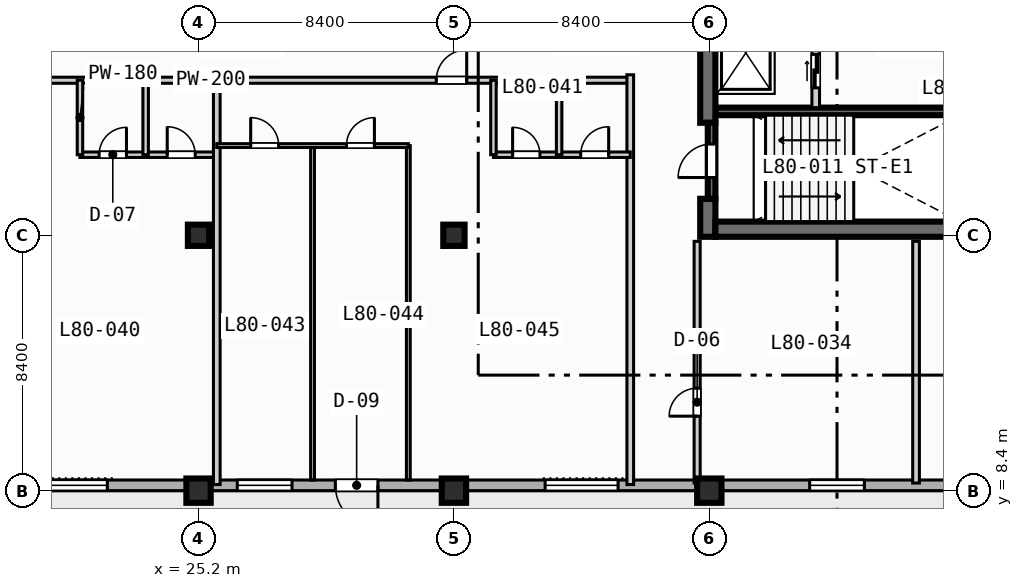
"""IFC4 building model, lengths in metres.
Left out: names, types, materials, properties, quantities, classifications, styles, units other than length and angle.
Written with IfcOpenShell. Run it as: python <this file> out.ifc"""

import sys

from ifc_helpers import new_model, si_unit, direction, frame, frame_2d, origin, origin_2d, place, context, subcontext, project, spatial, rectangle, extrude, element, fill, save


model = new_model("IFC4")
c1 = context("Model", 3, precision=1e-05, world=origin(), true_north=direction((0.0, 1.0)))
c2 = subcontext(c1, "Body", "Model", "MODEL_VIEW")
j1 = project(units=[si_unit("LENGTHUNIT", "METRE"), si_unit("PLANEANGLEUNIT", "RADIAN")], contexts=[c1])
p1 = place(None, origin())
s1 = spatial("IfcSite", under=j1, at=p1, CompositionType="ELEMENT")
p2 = place(p1, origin())
s2 = spatial("IfcBuilding", under=s1, at=p2, CompositionType="ELEMENT")
p3 = place(p2, frame((0.0, 0.0, 324.2)))
s3 = spatial("IfcBuildingStorey", under=s2, at=p3, CompositionType="ELEMENT", Elevation=324.2)
p4 = place(p3, frame((42.2, 20.875, 0.0), z_axis=(0.0, 0.0, 1.0), x_axis=(1.0, 0.0, 0.0)))
e1 = element("IfcWall", 1, at=p4, inside=s3, PredefinedType="SOLIDWALL", context=c2, shape_type="SweptSolid", body=[
    extrude(rectangle(XDim=8.05, YDim=0.25, at=frame_2d((4.025, 0.0))), origin(), (0.0, 0.0, 1.0), 3.67),
])
p5 = place(p3, frame((41.95, 16.75, 0.0), z_axis=(0.0, 0.0, 1.0), x_axis=(0.0, 1.0, 0.0)))
e2 = element("IfcWall", 2, at=p5, inside=s3, PredefinedType="SHEAR", context=c2, shape_type="SweptSolid", body=[
    extrude(rectangle(XDim=1.25, YDim=0.5, at=frame_2d((0.625, 0.0))), origin(), (0.0, 0.0, 1.0), 3.67),
])
p6 = place(p3, frame((41.95, 20.5, 0.0), z_axis=(0.0, 0.0, 1.0), x_axis=(0.0, 1.0, 0.0)))
e3 = element("IfcWall", 3, at=p6, inside=s3, PredefinedType="SHEAR", context=c2, shape_type="SweptSolid", body=[
    extrude(rectangle(XDim=4.95, YDim=0.5, at=frame_2d((2.475, 0.0))), origin(), (0.0, 0.0, 1.0), 3.67),
])
p7 = place(p3, frame((42.2, 17.0, 0.0), z_axis=(0.0, 0.0, 1.0), x_axis=(1.0, 0.0, 0.0)))
e4 = element("IfcWall", 4, at=p7, inside=s3, PredefinedType="SHEAR", context=c2, shape_type="SweptSolid", body=[
    extrude(rectangle(XDim=16.35, YDim=0.5, at=frame_2d((8.175, 0.0))), origin(), (0.0, 0.0, 1.0), 3.67),
])
p8 = place(p3, frame((25.2, 8.4, 0.0), z_axis=(0.0, 0.0, 1.0), x_axis=(1.0, 0.0, 0.0)))
e5 = element("IfcColumn", 5, at=p8, inside=s3, PredefinedType="COLUMN", context=c2, shape_type="SweptSolid", body=[
    extrude(rectangle(XDim=0.8, YDim=0.8, at=origin_2d()), origin(), (0.0, 0.0, 1.0), 3.9),
])
p9 = place(p3, frame((25.2, 16.8, 0.0), z_axis=(0.0, 0.0, 1.0), x_axis=(1.0, 0.0, 0.0)))
e6 = element("IfcColumn", 6, at=p9, inside=s3, PredefinedType="COLUMN", context=c2, shape_type="SweptSolid", body=[
    extrude(rectangle(XDim=0.7, YDim=0.7, at=origin_2d()), origin(), (0.0, 0.0, 1.0), 3.9),
])
p10 = place(p3, frame((33.6, 8.4, 0.0), z_axis=(0.0, 0.0, 1.0), x_axis=(1.0, 0.0, 0.0)))
e7 = element("IfcColumn", 7, at=p10, inside=s3, PredefinedType="COLUMN", context=c2, shape_type="SweptSolid", body=[
    extrude(rectangle(XDim=0.8, YDim=0.8, at=origin_2d()), origin(), (0.0, 0.0, 1.0), 3.9),
])
p11 = place(p3, frame((33.6, 16.8, 0.0), z_axis=(0.0, 0.0, 1.0), x_axis=(1.0, 0.0, 0.0)))
e8 = element("IfcColumn", 8, at=p11, inside=s3, PredefinedType="COLUMN", context=c2, shape_type="SweptSolid", body=[
    extrude(rectangle(XDim=0.7, YDim=0.7, at=origin_2d()), origin(), (0.0, 0.0, 1.0), 3.9),
])
p12 = place(p3, frame((42.0, 8.4, 0.0), z_axis=(0.0, 0.0, 1.0), x_axis=(1.0, 0.0, 0.0)))
e9 = element("IfcColumn", 9, at=p12, inside=s3, PredefinedType="COLUMN", context=c2, shape_type="SweptSolid", body=[
    extrude(rectangle(XDim=0.8, YDim=0.8, at=origin_2d()), origin(), (0.0, 0.0, 1.0), 3.9),
])
p13 = place(p3, frame((64.025, 8.575, 0.0), z_axis=(0.0, 0.0, 1.0), x_axis=(-1.0, 0.0, 0.0)))
e10 = element("IfcWall", 10, at=p13, inside=s3, PredefinedType="STANDARD", context=c2, shape_type="SweptSolid", body=[
    extrude(rectangle(XDim=52.45, YDim=0.35, at=frame_2d((26.225, 0.0))), origin(), (0.0, 0.0, 1.0), 3.67),
])
p14 = place(p13, frame((32.925, 0.0, 0.0)))
e11 = element("IfcOpeningElement", 11, at=p14, cuts=e10, PredefinedType="OPENING", context=c2, shape_type="SweptSolid", body=[
    extrude(rectangle(XDim=1.4, YDim=2.2, at=frame_2d((0.7, 1.1))), frame((0.0, 0.185, 0.0), z_axis=(0.0, -1.0, 0.0), x_axis=(1.0, 0.0, 0.0)), (0.0, 0.0, 1.0), 0.37),
])
p15 = place(p13, frame((41.825, 0.0, 0.85)))
e12 = element("IfcOpeningElement", 12, at=p15, cuts=e10, PredefinedType="OPENING", context=c2, shape_type="SweptSolid", body=[
    extrude(rectangle(XDim=2.4, YDim=1.95, at=frame_2d((1.2, 0.975))), frame((0.0, 0.185, 0.0), z_axis=(0.0, -1.0, 0.0), x_axis=(1.0, 0.0, 0.0)), (0.0, 0.0, 1.0), 0.37),
])
p16 = place(p13, frame((25.025, 0.0, 0.85)))
e13 = element("IfcOpeningElement", 13, at=p16, cuts=e10, PredefinedType="OPENING", context=c2, shape_type="SweptSolid", body=[
    extrude(rectangle(XDim=2.4, YDim=1.95, at=frame_2d((1.2, 0.975))), frame((0.0, 0.185, 0.0), z_axis=(0.0, -1.0, 0.0), x_axis=(1.0, 0.0, 0.0)), (0.0, 0.0, 1.0), 0.37),
])
p17 = place(p13, frame((16.925, 0.0, 0.85)))
e14 = element("IfcOpeningElement", 14, at=p17, cuts=e10, PredefinedType="OPENING", context=c2, shape_type="SweptSolid", body=[
    extrude(rectangle(XDim=1.8, YDim=1.8, at=frame_2d((0.9, 0.9))), frame((0.0, 0.185, 0.0), z_axis=(0.0, -1.0, 0.0), x_axis=(1.0, 0.0, 0.0)), (0.0, 0.0, 1.0), 0.37),
])
p18 = place(p13, frame((49.75, 0.0, 0.85)))
e15 = element("IfcOpeningElement", 15, at=p18, cuts=e10, PredefinedType="OPENING", context=c2, shape_type="SweptSolid", body=[
    extrude(rectangle(XDim=1.8, YDim=1.8, at=frame_2d((0.9, 0.9))), frame((0.0, 0.185, 0.0), z_axis=(0.0, -1.0, 0.0), x_axis=(1.0, 0.0, 0.0)), (0.0, 0.0, 1.0), 0.37),
])
p19 = place(p13, frame((47.89, 0.0, 0.85)))
e16 = element("IfcOpeningElement", 16, at=p19, cuts=e10, PredefinedType="OPENING", context=c2, shape_type="SweptSolid", body=[
    extrude(rectangle(XDim=0.72, YDim=1.8, at=frame_2d((0.36, 0.9))), frame((0.0, 0.185, 0.0), z_axis=(0.0, -1.0, 0.0), x_axis=(1.0, 0.0, 0.0)), (0.0, 0.0, 1.0), 0.37),
])
p20 = place(p13, frame((35.75, 0.0, 0.85)))
e17 = element("IfcOpeningElement", 17, at=p20, cuts=e10, PredefinedType="OPENING", context=c2, shape_type="SweptSolid", body=[
    extrude(rectangle(XDim=1.8, YDim=1.8, at=frame_2d((0.9, 0.9))), frame((0.0, 0.185, 0.0), z_axis=(0.0, -1.0, 0.0), x_axis=(1.0, 0.0, 0.0)), (0.0, 0.0, 1.0), 0.37),
])
p21 = place(p3, frame((42.075, 18.0, 0.0), z_axis=(0.0, 0.0, 1.0), x_axis=(0.0, 1.0, 0.0)))
e18 = element("IfcWall", 18, at=p21, inside=s3, PredefinedType="SOLIDWALL", context=c2, shape_type="SweptSolid", body=[
    extrude(rectangle(XDim=2.5, YDim=0.25, at=frame_2d((1.25, 0.0))), origin(), (0.0, 0.0, 1.0), 3.67),
])
p22 = place(p21, frame((0.7, 0.0, 0.0)))
e19 = element("IfcOpeningElement", 19, at=p22, cuts=e18, PredefinedType="OPENING", context=c2, shape_type="SweptSolid", body=[
    extrude(rectangle(XDim=1.1, YDim=2.15, at=frame_2d((0.55, 1.075))), frame((0.0, 0.135, 0.0), z_axis=(0.0, -1.0, 0.0), x_axis=(1.0, 0.0, 0.0)), (0.0, 0.0, 1.0), 0.27),
])
p23 = place(p3, frame((45.5, 21.0, 0.0), z_axis=(0.0, 0.0, 1.0), x_axis=(0.0, 1.0, 0.0)))
e20 = element("IfcWall", 20, at=p23, inside=s3, PredefinedType="SOLIDWALL", context=c2, shape_type="SweptSolid", body=[
    extrude(rectangle(XDim=4.15, YDim=0.25, at=frame_2d((2.075, 0.0))), origin(), (0.0, 0.0, 1.0), 3.67),
])
p24 = place(p23, frame((0.65, 0.0, 0.0)))
e21 = element("IfcOpeningElement", 21, at=p24, cuts=e20, PredefinedType="OPENING", context=c2, shape_type="SweptSolid", body=[
    extrude(rectangle(XDim=1.1, YDim=2.15, at=frame_2d((0.55, 1.075))), frame((0.0, 0.135, 0.0), z_axis=(0.0, -1.0, 0.0), x_axis=(1.0, 0.0, 0.0)), (0.0, 0.0, 1.0), 0.27),
])
p25 = place(p3, frame((41.6, 8.65, 0.0), z_axis=(0.0, 0.0, 1.0), x_axis=(0.0, 1.0, 0.0)))
e22 = element("IfcWall", 22, at=p25, inside=s3, PredefinedType="PARTITIONING", context=c2, shape_type="SweptSolid", body=[
    extrude(rectangle(XDim=7.95, YDim=0.2, at=frame_2d((3.975, 0.0))), origin(), (0.0, 0.0, 1.0), 3.67),
])
p26 = place(p25, frame((2.2, 0.0, 0.0)))
e23 = element("IfcOpeningElement", 23, at=p26, cuts=e22, PredefinedType="OPENING", context=c2, shape_type="SweptSolid", body=[
    extrude(rectangle(XDim=0.92, YDim=2.1, at=frame_2d((0.46, 1.05))), frame((0.0, 0.11, 0.0), z_axis=(0.0, -1.0, 0.0), x_axis=(1.0, 0.0, 0.0)), (0.0, 0.0, 1.0), 0.22),
])
p27 = place(p3, frame((48.8, 8.65, 0.0), z_axis=(0.0, 0.0, 1.0), x_axis=(0.0, 1.0, 0.0)))
e24 = element("IfcWall", 24, at=p27, inside=s3, PredefinedType="PARTITIONING", context=c2, shape_type="SweptSolid", body=[
    extrude(rectangle(XDim=7.95, YDim=0.22, at=frame_2d((3.975, 0.0))), origin(), (0.0, 0.0, 1.0), 3.67),
])
p28 = place(p3, frame((11.8, 21.9, 0.0), z_axis=(0.0, 0.0, 1.0), x_axis=(1.0, 0.0, 0.0)))
e25 = element("IfcWall", 25, at=p28, inside=s3, PredefinedType="PARTITIONING", context=c2, shape_type="SweptSolid", body=[
    extrude(rectangle(XDim=27.6, YDim=0.2, at=frame_2d((13.8, 0.0))), origin(), (0.0, 0.0, 1.0), 3.67),
])
p29 = place(p28, frame((7.42, 0.0, 0.0)))
e26 = element("IfcOpeningElement", 26, at=p29, cuts=e25, PredefinedType="OPENING", context=c2, shape_type="SweptSolid", body=[
    extrude(rectangle(XDim=1.0, YDim=2.15, at=frame_2d((0.5, 1.075))), frame((0.0, 0.11, 0.0), z_axis=(0.0, -1.0, 0.0), x_axis=(1.0, 0.0, 0.0)), (0.0, 0.0, 1.0), 0.22),
])
p30 = place(p28, frame((21.22, 0.0, 0.0)))
e27 = element("IfcOpeningElement", 27, at=p30, cuts=e25, PredefinedType="OPENING", context=c2, shape_type="SweptSolid", body=[
    extrude(rectangle(XDim=1.0, YDim=2.15, at=frame_2d((0.5, 1.075))), frame((0.0, 0.11, 0.0), z_axis=(0.0, -1.0, 0.0), x_axis=(1.0, 0.0, 0.0)), (0.0, 0.0, 1.0), 0.22),
])
p31 = place(p3, frame((21.3, 19.45, 0.0), z_axis=(0.0, 0.0, 1.0), x_axis=(1.0, 0.0, 0.0)))
e28 = element("IfcWall", 28, at=p31, inside=s3, PredefinedType="PLUMBINGWALL", context=c2, shape_type="SweptSolid", body=[
    extrude(rectangle(XDim=4.5, YDim=0.18, at=frame_2d((2.25, 0.0))), origin(), (0.0, 0.0, 1.0), 3.67),
])
p32 = place(p31, frame((0.63, 0.0, 0.0)))
e29 = element("IfcOpeningElement", 29, at=p32, cuts=e28, PredefinedType="OPENING", context=c2, shape_type="SweptSolid", body=[
    extrude(rectangle(XDim=0.9, YDim=2.1, at=frame_2d((0.45, 1.05))), frame((0.0, 0.1, 0.0), z_axis=(0.0, -1.0, 0.0), x_axis=(1.0, 0.0, 0.0)), (0.0, 0.0, 1.0), 0.2),
])
p33 = place(p31, frame((2.87, 0.0, 0.0)))
e30 = element("IfcOpeningElement", 30, at=p33, cuts=e28, PredefinedType="OPENING", context=c2, shape_type="SweptSolid", body=[
    extrude(rectangle(XDim=0.92, YDim=2.1, at=frame_2d((0.46, 1.05))), frame((0.0, 0.1, 0.0), z_axis=(0.0, -1.0, 0.0), x_axis=(1.0, 0.0, 0.0)), (0.0, 0.0, 1.0), 0.2),
])
for number, where, z_axis, x_axis in (
    (31, (21.3, 19.45, 0.0), (0.0, 0.0, 1.0), (0.0, 1.0, 0.0)),
    (32, (23.46, 19.45, 0.0), (0.0, 0.0, 1.0), (0.0, 1.0, 0.0)),
):
    element("IfcWall", number, at=place(p3, frame(where, z_axis=z_axis, x_axis=x_axis)), inside=s3, PredefinedType="PLUMBINGWALL", context=c2, shape_type="SweptSolid", body=[
        extrude(rectangle(XDim=2.45, YDim=0.18, at=frame_2d((1.225, 0.0))), origin(), (0.0, 0.0, 1.0), 3.67),
    ])
for number, where, z_axis, x_axis in (
    (33, (25.8, 8.6, 0.0), (0.0, 0.0, 1.0), (0.0, 1.0, 0.0)),
    (34, (39.4, 8.6, 0.0), (0.0, 0.0, 1.0), (0.0, 1.0, 0.0)),
):
    element("IfcWall", number, at=place(p3, frame(where, z_axis=z_axis, x_axis=x_axis)), inside=s3, PredefinedType="PARTITIONING", context=c2, shape_type="SweptSolid", body=[
        extrude(rectangle(XDim=13.48, YDim=0.22, at=frame_2d((6.74, 0.0))), origin(), (0.0, 0.0, 1.0), 3.67),
    ])
p34 = place(p3, frame((34.9, 19.45, 0.0), z_axis=(0.0, 0.0, 1.0), x_axis=(1.0, 0.0, 0.0)))
e35 = element("IfcWall", 35, at=p34, inside=s3, PredefinedType="PLUMBINGWALL", context=c2, shape_type="SweptSolid", body=[
    extrude(rectangle(XDim=4.5, YDim=0.18, at=frame_2d((2.25, 0.0))), origin(), (0.0, 0.0, 1.0), 3.67),
])
p35 = place(p34, frame((0.63, 0.0, 0.0)))
e36 = element("IfcOpeningElement", 36, at=p35, cuts=e35, PredefinedType="OPENING", context=c2, shape_type="SweptSolid", body=[
    extrude(rectangle(XDim=0.9, YDim=2.1, at=frame_2d((0.45, 1.05))), frame((0.0, 0.1, 0.0), z_axis=(0.0, -1.0, 0.0), x_axis=(1.0, 0.0, 0.0)), (0.0, 0.0, 1.0), 0.2),
])
p36 = place(p34, frame((2.87, 0.0, 0.0)))
e37 = element("IfcOpeningElement", 37, at=p36, cuts=e35, PredefinedType="OPENING", context=c2, shape_type="SweptSolid", body=[
    extrude(rectangle(XDim=0.92, YDim=2.1, at=frame_2d((0.46, 1.05))), frame((0.0, 0.1, 0.0), z_axis=(0.0, -1.0, 0.0), x_axis=(1.0, 0.0, 0.0)), (0.0, 0.0, 1.0), 0.2),
])
for number, where, z_axis, x_axis in (
    (38, (34.9, 19.45, 0.0), (0.0, 0.0, 1.0), (0.0, 1.0, 0.0)),
    (39, (37.06, 19.45, 0.0), (0.0, 0.0, 1.0), (0.0, 1.0, 0.0)),
):
    element("IfcWall", number, at=place(p3, frame(where, z_axis=z_axis, x_axis=x_axis)), inside=s3, PredefinedType="PLUMBINGWALL", context=c2, shape_type="SweptSolid", body=[
        extrude(rectangle(XDim=2.45, YDim=0.18, at=frame_2d((1.225, 0.0))), origin(), (0.0, 0.0, 1.0), 3.67),
    ])
for number, where, z_axis, x_axis in (
    (40, (28.95, 8.75, 0.0), (0.0, 0.0, 1.0), (0.0, 1.0, 0.0)),
    (41, (32.1, 8.75, 0.0), (0.0, 0.0, 1.0), (0.0, 1.0, 0.0)),
):
    element("IfcWall", number, at=place(p3, frame(where, z_axis=z_axis, x_axis=x_axis)), inside=s3, PredefinedType="PARTITIONING", context=c2, shape_type="SweptSolid", body=[
        extrude(rectangle(XDim=11.0, YDim=0.125, at=frame_2d((5.5, 0.0))), origin(), (0.0, 0.0, 1.0), 3.67),
    ])
p37 = place(p3, frame((25.8, 19.75, 0.0), z_axis=(0.0, 0.0, 1.0), x_axis=(1.0, 0.0, 0.0)))
e42 = element("IfcWall", 42, at=p37, inside=s3, PredefinedType="PARTITIONING", context=c2, shape_type="SweptSolid", body=[
    extrude(rectangle(XDim=6.3, YDim=0.125, at=frame_2d((3.15, 0.0))), origin(), (0.0, 0.0, 1.0), 3.67),
])
p38 = place(p37, frame((1.115, 0.0, 0.0)))
e43 = element("IfcOpeningElement", 43, at=p38, cuts=e42, PredefinedType="OPENING", context=c2, shape_type="SweptSolid", body=[
    extrude(rectangle(XDim=0.92, YDim=2.1, at=frame_2d((0.46, 1.05))), frame((0.0, 0.073, 0.0), z_axis=(0.0, -1.0, 0.0), x_axis=(1.0, 0.0, 0.0)), (0.0, 0.0, 1.0), 0.145),
])
p39 = place(p37, frame((4.265, 0.0, 0.0)))
e44 = element("IfcOpeningElement", 44, at=p39, cuts=e42, PredefinedType="OPENING", context=c2, shape_type="SweptSolid", body=[
    extrude(rectangle(XDim=0.92, YDim=2.1, at=frame_2d((0.46, 1.05))), frame((0.0, 0.073, 0.0), z_axis=(0.0, -1.0, 0.0), x_axis=(1.0, 0.0, 0.0)), (0.0, 0.0, 1.0), 0.145),
])
p40 = place(p14, origin())
e45 = element("IfcDoor", 45, at=p40, inside=s3, OperationType="SINGLE_SWING_LEFT", PredefinedType="DOOR", context=c2, shape_type="SweptSolid", body=[
    extrude(rectangle(XDim=1.4, YDim=2.2, at=frame_2d((0.7, 1.1))), frame((0.0, 0.025, 0.0), z_axis=(0.0, -1.0, 0.0), x_axis=(1.0, 0.0, 0.0)), (0.0, 0.0, 1.0), 0.05),
])
fill(e11, e45)
p41 = place(p15, origin())
e46 = element("IfcWindow", 46, at=p41, inside=s3, PartitioningType="SINGLE_PANEL", PredefinedType="WINDOW", context=c2, shape_type="SweptSolid", body=[
    extrude(rectangle(XDim=2.4, YDim=1.95, at=frame_2d((1.2, 0.975))), frame((0.0, 0.03, 0.0), z_axis=(0.0, -1.0, 0.0), x_axis=(1.0, 0.0, 0.0)), (0.0, 0.0, 1.0), 0.06),
])
fill(e12, e46)
p42 = place(p16, origin())
e47 = element("IfcWindow", 47, at=p42, inside=s3, PartitioningType="SINGLE_PANEL", PredefinedType="WINDOW", context=c2, shape_type="SweptSolid", body=[
    extrude(rectangle(XDim=2.4, YDim=1.95, at=frame_2d((1.2, 0.975))), frame((0.0, 0.03, 0.0), z_axis=(0.0, -1.0, 0.0), x_axis=(1.0, 0.0, 0.0)), (0.0, 0.0, 1.0), 0.06),
])
fill(e13, e47)
p43 = place(p17, origin())
e48 = element("IfcWindow", 48, at=p43, inside=s3, PartitioningType="SINGLE_PANEL", PredefinedType="WINDOW", context=c2, shape_type="SweptSolid", body=[
    extrude(rectangle(XDim=1.8, YDim=1.8, at=frame_2d((0.9, 0.9))), frame((0.0, 0.03, 0.0), z_axis=(0.0, -1.0, 0.0), x_axis=(1.0, 0.0, 0.0)), (0.0, 0.0, 1.0), 0.06),
])
fill(e14, e48)
p44 = place(p20, origin())
e49 = element("IfcWindow", 49, at=p44, inside=s3, PartitioningType="SINGLE_PANEL", PredefinedType="WINDOW", context=c2, shape_type="SweptSolid", body=[
    extrude(rectangle(XDim=1.8, YDim=1.8, at=frame_2d((0.9, 0.9))), frame((0.0, 0.03, 0.0), z_axis=(0.0, -1.0, 0.0), x_axis=(1.0, 0.0, 0.0)), (0.0, 0.0, 1.0), 0.06),
])
fill(e17, e49)
p45 = place(p22, origin())
e50 = element("IfcDoor", 50, at=p45, inside=s3, OperationType="SINGLE_SWING_LEFT", PredefinedType="DOOR", context=c2, shape_type="SweptSolid", body=[
    extrude(rectangle(XDim=1.1, YDim=2.15, at=frame_2d((0.55, 1.075))), frame((0.0, 0.025, 0.0), z_axis=(0.0, -1.0, 0.0), x_axis=(1.0, 0.0, 0.0)), (0.0, 0.0, 1.0), 0.05),
])
fill(e19, e50)
p46 = place(p24, origin())
e51 = element("IfcDoor", 51, at=p46, inside=s3, OperationType="SLIDING_TO_LEFT", PredefinedType="DOOR", context=c2, shape_type="SweptSolid", body=[
    extrude(rectangle(XDim=1.1, YDim=2.15, at=frame_2d((0.55, 1.075))), frame((0.0, 0.025, 0.0), z_axis=(0.0, -1.0, 0.0), x_axis=(1.0, 0.0, 0.0)), (0.0, 0.0, 1.0), 0.05),
])
fill(e21, e51)
p47 = place(p26, origin())
e52 = element("IfcDoor", 52, at=p47, inside=s3, OperationType="SINGLE_SWING_LEFT", PredefinedType="DOOR", context=c2, shape_type="SweptSolid", body=[
    extrude(rectangle(XDim=0.92, YDim=2.1, at=frame_2d((0.46, 1.05))), frame((0.0, 0.025, 0.0), z_axis=(0.0, -1.0, 0.0), x_axis=(1.0, 0.0, 0.0)), (0.0, 0.0, 1.0), 0.05),
])
fill(e23, e52)
p48 = place(p30, origin())
e53 = element("IfcDoor", 53, at=p48, inside=s3, OperationType="SINGLE_SWING_RIGHT", PredefinedType="DOOR", context=c2, shape_type="SweptSolid", body=[
    extrude(rectangle(XDim=1.0, YDim=2.15, at=frame_2d((0.5, 1.075))), frame((0.0, 0.025, 0.0), z_axis=(0.0, -1.0, 0.0), x_axis=(1.0, 0.0, 0.0)), (0.0, 0.0, 1.0), 0.05),
])
fill(e27, e53)
p49 = place(p32, origin())
e54 = element("IfcDoor", 54, at=p49, inside=s3, OperationType="SINGLE_SWING_RIGHT", PredefinedType="DOOR", context=c2, shape_type="SweptSolid", body=[
    extrude(rectangle(XDim=0.9, YDim=2.1, at=frame_2d((0.45, 1.05))), frame((0.0, 0.025, 0.0), z_axis=(0.0, -1.0, 0.0), x_axis=(1.0, 0.0, 0.0)), (0.0, 0.0, 1.0), 0.05),
])
fill(e29, e54)
p50 = place(p33, origin())
e55 = element("IfcDoor", 55, at=p50, inside=s3, OperationType="SINGLE_SWING_LEFT", PredefinedType="DOOR", context=c2, shape_type="SweptSolid", body=[
    extrude(rectangle(XDim=0.92, YDim=2.1, at=frame_2d((0.46, 1.05))), frame((0.0, 0.025, 0.0), z_axis=(0.0, -1.0, 0.0), x_axis=(1.0, 0.0, 0.0)), (0.0, 0.0, 1.0), 0.05),
])
fill(e30, e55)
p51 = place(p35, origin())
e56 = element("IfcDoor", 56, at=p51, inside=s3, OperationType="SINGLE_SWING_LEFT", PredefinedType="DOOR", context=c2, shape_type="SweptSolid", body=[
    extrude(rectangle(XDim=0.9, YDim=2.1, at=frame_2d((0.45, 1.05))), frame((0.0, 0.025, 0.0), z_axis=(0.0, -1.0, 0.0), x_axis=(1.0, 0.0, 0.0)), (0.0, 0.0, 1.0), 0.05),
])
fill(e36, e56)
p52 = place(p36, origin())
e57 = element("IfcDoor", 57, at=p52, inside=s3, OperationType="SINGLE_SWING_RIGHT", PredefinedType="DOOR", context=c2, shape_type="SweptSolid", body=[
    extrude(rectangle(XDim=0.92, YDim=2.1, at=frame_2d((0.46, 1.05))), frame((0.0, 0.025, 0.0), z_axis=(0.0, -1.0, 0.0), x_axis=(1.0, 0.0, 0.0)), (0.0, 0.0, 1.0), 0.05),
])
fill(e37, e57)
p53 = place(p38, origin())
e58 = element("IfcDoor", 58, at=p53, inside=s3, OperationType="SINGLE_SWING_LEFT", PredefinedType="DOOR", context=c2, shape_type="SweptSolid", body=[
    extrude(rectangle(XDim=0.92, YDim=2.1, at=frame_2d((0.46, 1.05))), frame((0.0, 0.025, 0.0), z_axis=(0.0, -1.0, 0.0), x_axis=(1.0, 0.0, 0.0)), (0.0, 0.0, 1.0), 0.05),
])
fill(e43, e58)
p54 = place(p39, origin())
e59 = element("IfcDoor", 59, at=p54, inside=s3, OperationType="SINGLE_SWING_RIGHT", PredefinedType="DOOR", context=c2, shape_type="SweptSolid", body=[
    extrude(rectangle(XDim=0.92, YDim=2.1, at=frame_2d((0.46, 1.05))), frame((0.0, 0.025, 0.0), z_axis=(0.0, -1.0, 0.0), x_axis=(1.0, 0.0, 0.0)), (0.0, 0.0, 1.0), 0.05),
])
fill(e44, e59)
save(model, sys.argv[1])
